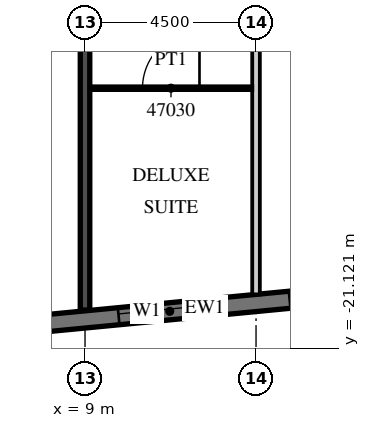
"""IFC4 building model, lengths in metres.
Left out: names, types, materials, properties, quantities, classifications, styles, units other than length and angle.
Written with IfcOpenShell. Run it as: python <this file> out.ifc"""

import sys

from ifc_helpers import new_model, si_unit, direction, frame, frame_2d, origin, place, context, subcontext, project, spatial, rectangle, extrude, element, fill, save


model = new_model("IFC4")
c1 = context("Model", 3, precision=1e-05, world=origin(), true_north=direction((0.0, 1.0)))
c2 = subcontext(c1, "Body", "Model", "MODEL_VIEW")
j1 = project(units=[si_unit("LENGTHUNIT", "METRE"), si_unit("PLANEANGLEUNIT", "RADIAN")], contexts=[c1])
p1 = place(None, origin())
s1 = spatial("IfcSite", under=j1, at=p1, CompositionType="ELEMENT")
p2 = place(p1, origin())
s2 = spatial("IfcBuilding", under=s1, at=p2, CompositionType="ELEMENT")
p3 = place(p2, frame((0.0, 0.0, 196.6)))
s3 = spatial("IfcBuildingStorey", under=s2, at=p3, CompositionType="ELEMENT", Elevation=196.6)
p4 = place(p3, frame((9.0, -20.112, 0.0), z_axis=(0.0, 0.0, 1.0), x_axis=(0.0, 1.0, 0.0)))
e1 = element("IfcWall", 1, at=p4, inside=s3, PredefinedType="SHEAR", context=c2, shape_type="SweptSolid", body=[
    extrude(rectangle(XDim=18.712, YDim=0.25, at=frame_2d((9.356, 0.0))), origin(), (0.0, 0.0, 1.0), 3.3),
])
p5 = place(p3, frame((-13.521, -22.529, 0.0), z_axis=(0.0, 0.0, 1.0), x_axis=(0.995396436651, 0.095843277819, 0.0)))
e2 = element("IfcWall", 2, at=p5, inside=s3, PredefinedType="SOLIDWALL", context=c2, shape_type="SweptSolid", body=[
    extrude(rectangle(XDim=51.578, YDim=0.45, at=frame_2d((25.789, 0.0))), origin(), (0.0, 0.0, 1.0), 3.02),
])
p6 = place(p5, frame((0.91, 0.0, 0.45)))
e3 = element("IfcOpeningElement", 3, at=p6, cuts=e2, PredefinedType="OPENING", context=c2, shape_type="SweptSolid", body=[
    extrude(rectangle(XDim=2.7, YDim=2.25, at=frame_2d((1.35, 1.125))), frame((0.0, 0.235, 0.0), z_axis=(0.0, -1.0, 0.0), x_axis=(1.0, 0.0, 0.0)), (0.0, 0.0, 1.0), 0.47),
])
p7 = place(p5, frame((5.431, 0.0, 0.45)))
e4 = element("IfcOpeningElement", 4, at=p7, cuts=e2, PredefinedType="OPENING", context=c2, shape_type="SweptSolid", body=[
    extrude(rectangle(XDim=2.7, YDim=2.25, at=frame_2d((1.35, 1.125))), frame((0.0, 0.235, 0.0), z_axis=(0.0, -1.0, 0.0), x_axis=(1.0, 0.0, 0.0)), (0.0, 0.0, 1.0), 0.47),
])
p8 = place(p5, frame((9.952, 0.0, 0.45)))
e5 = element("IfcOpeningElement", 5, at=p8, cuts=e2, PredefinedType="OPENING", context=c2, shape_type="SweptSolid", body=[
    extrude(rectangle(XDim=2.7, YDim=2.25, at=frame_2d((1.35, 1.125))), frame((0.0, 0.235, 0.0), z_axis=(0.0, -1.0, 0.0), x_axis=(1.0, 0.0, 0.0)), (0.0, 0.0, 1.0), 0.47),
])
p9 = place(p5, frame((14.473, 0.0, 0.45)))
e6 = element("IfcOpeningElement", 6, at=p9, cuts=e2, PredefinedType="OPENING", context=c2, shape_type="SweptSolid", body=[
    extrude(rectangle(XDim=2.7, YDim=2.25, at=frame_2d((1.35, 1.125))), frame((0.0, 0.235, 0.0), z_axis=(0.0, -1.0, 0.0), x_axis=(1.0, 0.0, 0.0)), (0.0, 0.0, 1.0), 0.47),
])
p10 = place(p5, frame((18.994, 0.0, 0.45)))
e7 = element("IfcOpeningElement", 7, at=p10, cuts=e2, PredefinedType="OPENING", context=c2, shape_type="SweptSolid", body=[
    extrude(rectangle(XDim=2.7, YDim=2.25, at=frame_2d((1.35, 1.125))), frame((0.0, 0.235, 0.0), z_axis=(0.0, -1.0, 0.0), x_axis=(1.0, 0.0, 0.0)), (0.0, 0.0, 1.0), 0.47),
])
p11 = place(p5, frame((23.514, 0.0, 0.45)))
e8 = element("IfcOpeningElement", 8, at=p11, cuts=e2, PredefinedType="OPENING", context=c2, shape_type="SweptSolid", body=[
    extrude(rectangle(XDim=2.7, YDim=2.25, at=frame_2d((1.35, 1.125))), frame((0.0, 0.235, 0.0), z_axis=(0.0, -1.0, 0.0), x_axis=(1.0, 0.0, 0.0)), (0.0, 0.0, 1.0), 0.47),
])
p12 = place(p5, frame((28.035, 0.0, 0.45)))
e9 = element("IfcOpeningElement", 9, at=p12, cuts=e2, PredefinedType="OPENING", context=c2, shape_type="SweptSolid", body=[
    extrude(rectangle(XDim=2.7, YDim=2.25, at=frame_2d((1.35, 1.125))), frame((0.0, 0.235, 0.0), z_axis=(0.0, -1.0, 0.0), x_axis=(1.0, 0.0, 0.0)), (0.0, 0.0, 1.0), 0.47),
])
p13 = place(p5, frame((32.556, 0.0, 0.45)))
e10 = element("IfcOpeningElement", 10, at=p13, cuts=e2, PredefinedType="OPENING", context=c2, shape_type="SweptSolid", body=[
    extrude(rectangle(XDim=2.7, YDim=2.25, at=frame_2d((1.35, 1.125))), frame((0.0, 0.235, 0.0), z_axis=(0.0, -1.0, 0.0), x_axis=(1.0, 0.0, 0.0)), (0.0, 0.0, 1.0), 0.47),
])
p14 = place(p5, frame((37.077, 0.0, 0.45)))
e11 = element("IfcOpeningElement", 11, at=p14, cuts=e2, PredefinedType="OPENING", context=c2, shape_type="SweptSolid", body=[
    extrude(rectangle(XDim=2.7, YDim=2.25, at=frame_2d((1.35, 1.125))), frame((0.0, 0.235, 0.0), z_axis=(0.0, -1.0, 0.0), x_axis=(1.0, 0.0, 0.0)), (0.0, 0.0, 1.0), 0.47),
])
p15 = place(p5, frame((41.598, 0.0, 0.45)))
e12 = element("IfcOpeningElement", 12, at=p15, cuts=e2, PredefinedType="OPENING", context=c2, shape_type="SweptSolid", body=[
    extrude(rectangle(XDim=2.7, YDim=2.25, at=frame_2d((1.35, 1.125))), frame((0.0, 0.235, 0.0), z_axis=(0.0, -1.0, 0.0), x_axis=(1.0, 0.0, 0.0)), (0.0, 0.0, 1.0), 0.47),
])
p16 = place(p5, frame((46.119, 0.0, 0.45)))
e13 = element("IfcOpeningElement", 13, at=p16, cuts=e2, PredefinedType="OPENING", context=c2, shape_type="SweptSolid", body=[
    extrude(rectangle(XDim=2.7, YDim=2.25, at=frame_2d((1.35, 1.125))), frame((0.0, 0.235, 0.0), z_axis=(0.0, -1.0, 0.0), x_axis=(1.0, 0.0, 0.0)), (0.0, 0.0, 1.0), 0.47),
])
p17 = place(p3, frame((13.5, -19.701, 0.0), z_axis=(0.0, 0.0, 1.0), x_axis=(0.0, 1.0, 0.0)))
e14 = element("IfcWall", 14, at=p17, inside=s3, PredefinedType="PARTITIONING", context=c2, shape_type="SweptSolid", body=[
    extrude(rectangle(XDim=18.301, YDim=0.2, at=frame_2d((9.15, 0.0))), origin(), (0.0, 0.0, 1.0), 3.02),
])
p18 = place(p3, frame((9.125, -14.275, 0.0), z_axis=(0.0, 0.0, 1.0), x_axis=(1.0, 0.0, 0.0)))
e15 = element("IfcWall", 15, at=p18, inside=s3, PredefinedType="PARTITIONING", context=c2, shape_type="SweptSolid", body=[
    extrude(rectangle(XDim=4.275, YDim=0.1, at=frame_2d((2.137, 0.0))), origin(), (0.0, 0.0, 1.0), 3.02),
])
p19 = place(p18, frame((1.387, 0.0, 0.0)))
e16 = element("IfcOpeningElement", 16, at=p19, cuts=e15, PredefinedType="OPENING", context=c2, shape_type="SweptSolid", body=[
    extrude(rectangle(XDim=1.5, YDim=2.1, at=frame_2d((0.75, 1.05))), frame((0.0, 0.06, 0.0), z_axis=(0.0, -1.0, 0.0), x_axis=(1.0, 0.0, 0.0)), (0.0, 0.0, 1.0), 0.12),
])
p20 = place(p11, origin())
e17 = element("IfcWindow", 17, at=p20, inside=s3, PartitioningType="SINGLE_PANEL", PredefinedType="WINDOW", context=c2, shape_type="SweptSolid", body=[
    extrude(rectangle(XDim=2.7, YDim=2.25, at=frame_2d((1.35, 1.125))), frame((0.0, 0.09, 0.0), z_axis=(0.0, -1.0, 0.0), x_axis=(1.0, 0.0, 0.0)), (0.0, 0.0, 1.0), 0.06),
])
fill(e8, e17)
p21 = place(p12, origin())
e18 = element("IfcWindow", 18, at=p21, inside=s3, PartitioningType="SINGLE_PANEL", PredefinedType="WINDOW", context=c2, shape_type="SweptSolid", body=[
    extrude(rectangle(XDim=2.7, YDim=2.25, at=frame_2d((1.35, 1.125))), frame((0.0, 0.09, 0.0), z_axis=(0.0, -1.0, 0.0), x_axis=(1.0, 0.0, 0.0)), (0.0, 0.0, 1.0), 0.06),
])
fill(e9, e18)
p22 = place(p19, origin())
e19 = element("IfcDoor", 19, at=p22, inside=s3, OperationType="SINGLE_SWING_RIGHT", PredefinedType="DOOR", context=c2, shape_type="SweptSolid", body=[
    extrude(rectangle(XDim=1.5, YDim=2.1, at=frame_2d((0.75, 1.05))), frame((0.0, 0.025, 0.0), z_axis=(0.0, -1.0, 0.0), x_axis=(1.0, 0.0, 0.0)), (0.0, 0.0, 1.0), 0.05),
])
fill(e16, e19)
save(model, sys.argv[1])
